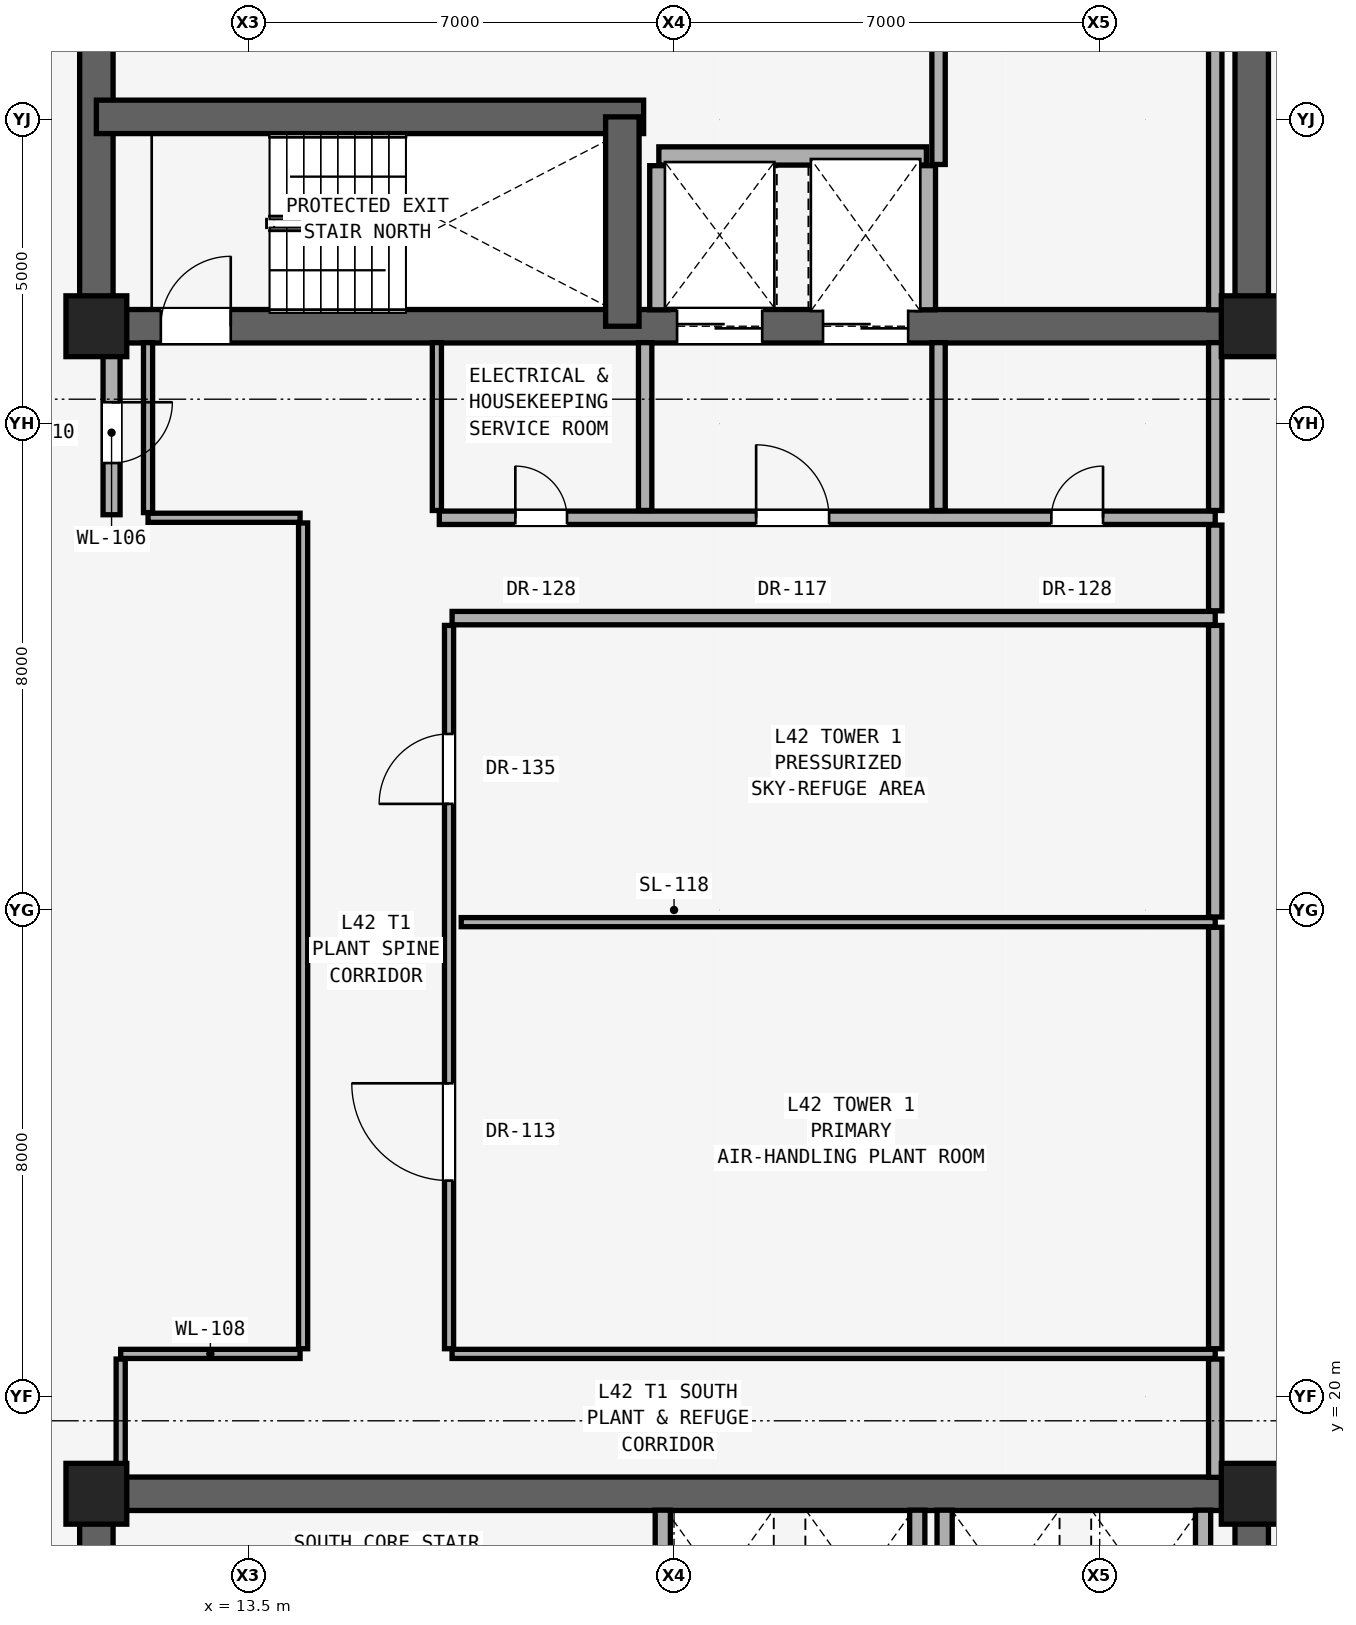
"""IFC4 building model, lengths in metres.
Left out: names, types, materials, properties, quantities, classifications, styles, units other than length and angle.
Written with IfcOpenShell. Run it as: python <this file> out.ifc"""

import sys

from ifc_helpers import new_model, si_unit, direction, frame, frame_2d, origin, origin_2d, place, context, subcontext, project, spatial, rectangle, extrude, element, fill, save


model = new_model("IFC4")
c1 = context("Model", 3, precision=1e-05, world=origin(), true_north=direction((0.0, 1.0)))
c2 = subcontext(c1, "Body", "Model", "MODEL_VIEW")
j1 = project(units=[si_unit("LENGTHUNIT", "METRE"), si_unit("PLANEANGLEUNIT", "RADIAN")], contexts=[c1])
p1 = place(None, origin())
s1 = spatial("IfcSite", under=j1, at=p1, CompositionType="ELEMENT")
p2 = place(p1, origin())
s2 = spatial("IfcBuilding", under=s1, at=p2, CompositionType="ELEMENT")
p3 = place(p2, frame((0.0, 0.0, 147.8)))
s3 = spatial("IfcBuildingStorey", under=s2, at=p3, CompositionType="ELEMENT", Elevation=147.8)
for number, where, z_axis, x_axis in (
    (1, (11.0, 18.4, 0.0), (0.0, 0.0, 1.0), (1.0, 0.0, 0.0)),
    (2, (30.0, 18.4, 0.0), (0.0, 0.0, 1.0), (1.0, 0.0, 0.0)),
    (3, (11.0, 37.6, 0.0), (0.0, 0.0, 1.0), (1.0, 0.0, 0.0)),
    (4, (30.0, 37.6, 0.0), (0.0, 0.0, 1.0), (1.0, 0.0, 0.0)),
):
    element("IfcColumn", number, at=place(p3, frame(where, z_axis=z_axis, x_axis=x_axis)), inside=s3, PredefinedType="COLUMN", context=c2, shape_type="SweptSolid", body=[
        extrude(rectangle(XDim=1.0, YDim=1.0, at=origin_2d()), origin(), (0.0, 0.0, 1.0), 6.6),
    ])
for number, where, z_axis, x_axis in (
    (5, (11.0, 37.6, 0.0), (0.0, 0.0, 1.0), (0.0, 1.0, 0.0)),
    (6, (30.0, 37.6, 0.0), (0.0, 0.0, 1.0), (0.0, 1.0, 0.0)),
):
    element("IfcWall", number, at=place(p3, frame(where, z_axis=z_axis, x_axis=x_axis)), inside=s3, PredefinedType="SHEAR", context=c2, shape_type="SweptSolid", body=[
        extrude(rectangle(XDim=6.0, YDim=0.55, at=frame_2d((3.0, 0.0))), origin(), (0.0, 0.0, 1.0), 6.4),
    ])
p4 = place(p3, frame((11.0, 37.6, 0.0), z_axis=(0.0, 0.0, 1.0), x_axis=(1.0, 0.0, 0.0)))
e7 = element("IfcWall", 7, at=p4, inside=s3, PredefinedType="SHEAR", context=c2, shape_type="SweptSolid", body=[
    extrude(rectangle(XDim=19.0, YDim=0.55, at=frame_2d((9.5, 0.0))), origin(), (0.0, 0.0, 1.0), 6.4),
])
p5 = place(p4, frame((1.06, 0.0, 0.0)))
e8 = element("IfcOpeningElement", 8, at=p5, cuts=e7, PredefinedType="OPENING", context=c2, shape_type="SweptSolid", body=[
    extrude(rectangle(XDim=1.15, YDim=2.2, at=frame_2d((0.575, 1.1))), frame((0.0, 0.285, 0.0), z_axis=(0.0, -1.0, 0.0), x_axis=(1.0, 0.0, 0.0)), (0.0, 0.0, 1.0), 0.57),
])
p6 = place(p4, frame((9.55, 0.0, 0.0)))
e9 = element("IfcOpeningElement", 9, at=p6, cuts=e7, PredefinedType="OPENING", context=c2, shape_type="SweptSolid", body=[
    extrude(rectangle(XDim=1.4, YDim=2.35, at=frame_2d((0.7, 1.175))), frame((0.0, 0.285, 0.0), z_axis=(0.0, -1.0, 0.0), x_axis=(1.0, 0.0, 0.0)), (0.0, 0.0, 1.0), 0.57),
])
p7 = place(p4, frame((11.95, 0.0, 0.0)))
e10 = element("IfcOpeningElement", 10, at=p7, cuts=e7, PredefinedType="OPENING", context=c2, shape_type="SweptSolid", body=[
    extrude(rectangle(XDim=1.4, YDim=2.35, at=frame_2d((0.7, 1.175))), frame((0.0, 0.285, 0.0), z_axis=(0.0, -1.0, 0.0), x_axis=(1.0, 0.0, 0.0)), (0.0, 0.0, 1.0), 0.57),
])
p8 = place(p3, frame((11.0, 41.043, 0.0), z_axis=(0.0, 0.0, 1.0), x_axis=(1.0, 0.0, 0.0)))
e11 = element("IfcWall", 11, at=p8, inside=s3, PredefinedType="SHEAR", context=c2, shape_type="SweptSolid", body=[
    extrude(rectangle(XDim=9.0, YDim=0.55, at=frame_2d((4.5, 0.0))), origin(), (0.0, 0.0, 1.0), 6.4),
])
p9 = place(p3, frame((19.65, 37.6, 0.0), z_axis=(0.0, 0.0, 1.0), x_axis=(0.0, 1.0, 0.0)))
e12 = element("IfcWall", 12, at=p9, inside=s3, PredefinedType="SHEAR", context=c2, shape_type="SweptSolid", body=[
    extrude(rectangle(XDim=3.443, YDim=0.55, at=frame_2d((1.721, 0.0))), origin(), (0.0, 0.0, 1.0), 6.4),
])
for number, where, z_axis, x_axis in (
    (13, (11.0, 12.4, 0.0), (0.0, 0.0, 1.0), (0.0, 1.0, 0.0)),
    (14, (30.0, 12.4, 0.0), (0.0, 0.0, 1.0), (0.0, 1.0, 0.0)),
):
    element("IfcWall", number, at=place(p3, frame(where, z_axis=z_axis, x_axis=x_axis)), inside=s3, PredefinedType="SHEAR", context=c2, shape_type="SweptSolid", body=[
        extrude(rectangle(XDim=6.0, YDim=0.55, at=frame_2d((3.0, 0.0))), origin(), (0.0, 0.0, 1.0), 6.4),
    ])
p10 = place(p3, frame((11.0, 18.4, 0.0), z_axis=(0.0, 0.0, 1.0), x_axis=(1.0, 0.0, 0.0)))
e15 = element("IfcWall", 15, at=p10, inside=s3, PredefinedType="SHEAR", context=c2, shape_type="SweptSolid", body=[
    extrude(rectangle(XDim=19.0, YDim=0.55, at=frame_2d((9.5, 0.0))), origin(), (0.0, 0.0, 1.0), 6.4),
])
p11 = place(p3, frame((11.25, 37.2, 0.0), z_axis=(0.0, 0.0, 1.0), x_axis=(0.0, -1.0, 0.0)))
e16 = element("IfcWall", 16, at=p11, inside=s3, PredefinedType="SOLIDWALL", context=c2, shape_type="SweptSolid", body=[
    extrude(rectangle(XDim=2.7, YDim=0.28, at=frame_2d((1.35, 0.0))), origin(), (0.0, 0.0, 1.0), 4.95),
])
p12 = place(p11, frame((0.85, 0.0, 0.0)))
e17 = element("IfcOpeningElement", 17, at=p12, cuts=e16, PredefinedType="OPENING", context=c2, shape_type="SweptSolid", body=[
    extrude(rectangle(XDim=1.0, YDim=2.15, at=frame_2d((0.5, 1.075))), frame((0.0, 0.15, 0.0), z_axis=(0.0, -1.0, 0.0), x_axis=(1.0, 0.0, 0.0)), (0.0, 0.0, 1.0), 0.3),
])
p13 = place(p3, frame((11.4, 20.7, 0.0), z_axis=(0.0, 0.0, 1.0), x_axis=(1.0, 0.0, 0.0)))
e18 = element("IfcWall", 18, at=p13, inside=s3, PredefinedType="PARTITIONING", context=c2, shape_type="SweptSolid", body=[
    extrude(rectangle(XDim=2.95, YDim=0.15, at=frame_2d((1.475, 0.0))), origin(), (0.0, 0.0, 1.0), 6.4),
])
p14 = place(p3, frame((16.85, 20.7, 0.0), z_axis=(0.0, 0.0, 1.0), x_axis=(1.0, 0.0, 0.0)))
e19 = element("IfcWall", 19, at=p14, inside=s3, PredefinedType="PARTITIONING", context=c2, shape_type="SweptSolid", body=[
    extrude(rectangle(XDim=12.55, YDim=0.15, at=frame_2d((6.275, 0.0))), origin(), (0.0, 0.0, 1.0), 5.975),
])
p15 = place(p3, frame((17.0, 27.8, 0.0), z_axis=(0.0, 0.0, 1.0), x_axis=(1.0, 0.0, 0.0)))
e20 = element("IfcWall", 20, at=p15, inside=s3, PredefinedType="PARTITIONING", context=c2, shape_type="SweptSolid", body=[
    extrude(rectangle(XDim=12.4, YDim=0.15, at=frame_2d((6.2, 0.0))), origin(), (0.0, 0.0, 1.0), 5.975),
])
p16 = place(p3, frame((16.85, 32.8, 0.0), z_axis=(0.0, 0.0, 1.0), x_axis=(1.0, 0.0, 0.0)))
e21 = element("IfcWall", 21, at=p16, inside=s3, PredefinedType="SOLIDWALL", context=c2, shape_type="SweptSolid", body=[
    extrude(rectangle(XDim=12.55, YDim=0.22, at=frame_2d((6.275, 0.0))), origin(), (0.0, 0.0, 1.0), 5.975),
])
p17 = place(p3, frame((11.85, 34.45, 0.0), z_axis=(0.0, 0.0, 1.0), x_axis=(1.0, 0.0, 0.0)))
e22 = element("IfcWall", 22, at=p17, inside=s3, PredefinedType="PARTITIONING", context=c2, shape_type="SweptSolid", body=[
    extrude(rectangle(XDim=2.5, YDim=0.15, at=frame_2d((1.25, 0.0))), origin(), (0.0, 0.0, 1.0), 6.4),
])
p18 = place(p3, frame((16.64, 34.45, 0.0), z_axis=(0.0, 0.0, 1.0), x_axis=(1.0, 0.0, 0.0)))
e23 = element("IfcWall", 23, at=p18, inside=s3, PredefinedType="SOLIDWALL", context=c2, shape_type="SweptSolid", body=[
    extrude(rectangle(XDim=12.76, YDim=0.22, at=frame_2d((6.38, 0.0))), origin(), (0.0, 0.0, 1.0), 5.975),
])
p19 = place(p18, frame((5.21, 0.0, 0.0)))
e24 = element("IfcOpeningElement", 24, at=p19, cuts=e23, PredefinedType="OPENING", context=c2, shape_type="SweptSolid", body=[
    extrude(rectangle(XDim=1.2, YDim=2.25, at=frame_2d((0.6, 1.125))), frame((0.0, 0.12, 0.0), z_axis=(0.0, -1.0, 0.0), x_axis=(1.0, 0.0, 0.0)), (0.0, 0.0, 1.0), 0.24),
])
p20 = place(p18, frame((10.065, 0.0, 0.0)))
e25 = element("IfcOpeningElement", 25, at=p20, cuts=e23, PredefinedType="OPENING", context=c2, shape_type="SweptSolid", body=[
    extrude(rectangle(XDim=0.85, YDim=2.01, at=frame_2d((0.425, 1.005))), frame((0.0, 0.12, 0.0), z_axis=(0.0, -1.0, 0.0), x_axis=(1.0, 0.0, 0.0)), (0.0, 0.0, 1.0), 0.24),
])
p21 = place(p18, frame((1.25, 0.0, 0.0)))
e26 = element("IfcOpeningElement", 26, at=p21, cuts=e23, PredefinedType="OPENING", context=c2, shape_type="SweptSolid", body=[
    extrude(rectangle(XDim=0.85, YDim=2.01, at=frame_2d((0.425, 1.005))), frame((0.0, 0.12, 0.0), z_axis=(0.0, -1.0, 0.0), x_axis=(1.0, 0.0, 0.0)), (0.0, 0.0, 1.0), 0.24),
])
p22 = place(p3, frame((20.25, 40.4, 0.0), z_axis=(0.0, 0.0, 1.0), x_axis=(1.0, 0.0, 0.0)))
e27 = element("IfcWall", 27, at=p22, inside=s3, PredefinedType="SOLIDWALL", context=c2, shape_type="SweptSolid", body=[
    extrude(rectangle(XDim=4.4, YDim=0.3, at=frame_2d((2.2, 0.0))), origin(), (0.0, 0.0, 1.0), 6.4),
])
p23 = place(p3, frame((11.4, 18.67, 0.0), z_axis=(0.0, 0.0, 1.0), x_axis=(0.0, 1.0, 0.0)))
e28 = element("IfcWall", 28, at=p23, inside=s3, PredefinedType="PARTITIONING", context=c2, shape_type="SweptSolid", body=[
    extrude(rectangle(XDim=1.945, YDim=0.15, at=frame_2d((0.973, 0.0))), origin(), (0.0, 0.0, 1.0), 6.4),
])
p24 = place(p3, frame((11.85, 34.535, 0.0), z_axis=(0.0, 0.0, 1.0), x_axis=(0.0, 1.0, 0.0)))
e29 = element("IfcWall", 29, at=p24, inside=s3, PredefinedType="PARTITIONING", context=c2, shape_type="SweptSolid", body=[
    extrude(rectangle(XDim=2.795, YDim=0.15, at=frame_2d((1.397, 0.0))), origin(), (0.0, 0.0, 1.0), 6.4),
])
p25 = place(p3, frame((14.4, 20.785, 0.0), z_axis=(0.0, 0.0, 1.0), x_axis=(0.0, 1.0, 0.0)))
e30 = element("IfcWall", 30, at=p25, inside=s3, PredefinedType="PARTITIONING", context=c2, shape_type="SweptSolid", body=[
    extrude(rectangle(XDim=13.58, YDim=0.15, at=frame_2d((6.79, 0.0))), origin(), (0.0, 0.0, 1.0), 5.536),
])
p26 = place(p3, frame((16.6, 34.57, 0.0), z_axis=(0.0, 0.0, 1.0), x_axis=(0.0, 1.0, 0.0)))
e31 = element("IfcWall", 31, at=p26, inside=s3, PredefinedType="PARTITIONING", context=c2, shape_type="SweptSolid", body=[
    extrude(rectangle(XDim=2.76, YDim=0.15, at=frame_2d((1.38, 0.0))), origin(), (0.0, 0.0, 1.0), 6.4),
])
p27 = place(p3, frame((16.8, 20.785, 0.0), z_axis=(0.0, 0.0, 1.0), x_axis=(0.0, 1.0, 0.0)))
e32 = element("IfcWall", 32, at=p27, inside=s3, PredefinedType="PARTITIONING", context=c2, shape_type="SweptSolid", body=[
    extrude(rectangle(XDim=11.895, YDim=0.15, at=frame_2d((5.948, 0.0))), origin(), (0.0, 0.0, 1.0), 5.536),
])
p28 = place(p27, frame((8.96, 0.0, 0.0)))
e33 = element("IfcOpeningElement", 33, at=p28, cuts=e32, PredefinedType="OPENING", context=c2, shape_type="SweptSolid", body=[
    extrude(rectangle(XDim=1.15, YDim=2.2, at=frame_2d((0.575, 1.1))), frame((0.0, 0.085, 0.0), z_axis=(0.0, -1.0, 0.0), x_axis=(1.0, 0.0, 0.0)), (0.0, 0.0, 1.0), 0.17),
])
p29 = place(p27, frame((2.765, 0.0, 0.0)))
e34 = element("IfcOpeningElement", 34, at=p29, cuts=e32, PredefinedType="OPENING", context=c2, shape_type="SweptSolid", body=[
    extrude(rectangle(XDim=1.6, YDim=2.3, at=frame_2d((0.8, 1.15))), frame((0.0, 0.085, 0.0), z_axis=(0.0, -1.0, 0.0), x_axis=(1.0, 0.0, 0.0)), (0.0, 0.0, 1.0), 0.17),
])
p30 = place(p3, frame((20.025, 34.57, 0.0), z_axis=(0.0, 0.0, 1.0), x_axis=(0.0, 1.0, 0.0)))
e35 = element("IfcWall", 35, at=p30, inside=s3, PredefinedType="SOLIDWALL", context=c2, shape_type="SweptSolid", body=[
    extrude(rectangle(XDim=2.76, YDim=0.22, at=frame_2d((1.38, 0.0))), origin(), (0.0, 0.0, 1.0), 6.4),
])
p31 = place(p3, frame((20.315, 16.555, 0.0), z_axis=(0.0, 0.0, 1.0), x_axis=(0.0, 1.0, 0.0)))
e36 = element("IfcWall", 36, at=p31, inside=s3, PredefinedType="SOLIDWALL", context=c2, shape_type="SweptSolid", body=[
    extrude(rectangle(XDim=1.575, YDim=0.25, at=frame_2d((0.788, 0.0))), origin(), (0.0, 0.0, 1.0), 6.4),
])
p32 = place(p3, frame((20.25, 37.87, 0.0), z_axis=(0.0, 0.0, 1.0), x_axis=(0.0, 1.0, 0.0)))
e37 = element("IfcWall", 37, at=p32, inside=s3, PredefinedType="SOLIDWALL", context=c2, shape_type="SweptSolid", body=[
    extrude(rectangle(XDim=2.37, YDim=0.3, at=frame_2d((1.185, 0.0))), origin(), (0.0, 0.0, 1.0), 6.4),
])
p33 = place(p3, frame((24.5, 15.785, 0.0), z_axis=(0.0, 0.0, 1.0), x_axis=(0.0, 1.0, 0.0)))
e38 = element("IfcWall", 38, at=p33, inside=s3, PredefinedType="SOLIDWALL", context=c2, shape_type="SweptSolid", body=[
    extrude(rectangle(XDim=2.345, YDim=0.25, at=frame_2d((1.172, 0.0))), origin(), (0.0, 0.0, 1.0), 6.4),
])
p34 = place(p3, frame((24.65, 37.87, 0.0), z_axis=(0.0, 0.0, 1.0), x_axis=(0.0, 1.0, 0.0)))
e39 = element("IfcWall", 39, at=p34, inside=s3, PredefinedType="SOLIDWALL", context=c2, shape_type="SweptSolid", body=[
    extrude(rectangle(XDim=2.37, YDim=0.3, at=frame_2d((1.185, 0.0))), origin(), (0.0, 0.0, 1.0), 6.4),
])
p35 = place(p3, frame((24.95, 15.785, 0.0), z_axis=(0.0, 0.0, 1.0), x_axis=(0.0, 1.0, 0.0)))
e40 = element("IfcWall", 40, at=p35, inside=s3, PredefinedType="SOLIDWALL", context=c2, shape_type="SweptSolid", body=[
    extrude(rectangle(XDim=2.345, YDim=0.25, at=frame_2d((1.172, 0.0))), origin(), (0.0, 0.0, 1.0), 6.4),
])
p36 = place(p3, frame((24.85, 34.57, 0.0), z_axis=(0.0, 0.0, 1.0), x_axis=(0.0, 1.0, 0.0)))
e41 = element("IfcWall", 41, at=p36, inside=s3, PredefinedType="SOLIDWALL", context=c2, shape_type="SweptSolid", body=[
    extrude(rectangle(XDim=2.76, YDim=0.22, at=frame_2d((1.38, 0.0))), origin(), (0.0, 0.0, 1.0), 6.4),
])
p37 = place(p3, frame((24.85, 40.26, 0.0), z_axis=(0.0, 0.0, 1.0), x_axis=(0.0, 1.0, 0.0)))
e42 = element("IfcWall", 42, at=p37, inside=s3, PredefinedType="SOLIDWALL", context=c2, shape_type="SweptSolid", body=[
    extrude(rectangle(XDim=2.94, YDim=0.22, at=frame_2d((1.47, 0.0))), origin(), (0.0, 0.0, 1.0), 6.4),
])
p38 = place(p3, frame((29.2, 15.785, 0.0), z_axis=(0.0, 0.0, 1.0), x_axis=(0.0, 1.0, 0.0)))
e43 = element("IfcWall", 43, at=p38, inside=s3, PredefinedType="SOLIDWALL", context=c2, shape_type="SweptSolid", body=[
    extrude(rectangle(XDim=2.345, YDim=0.25, at=frame_2d((1.172, 0.0))), origin(), (0.0, 0.0, 1.0), 6.4),
])
p39 = place(p3, frame((29.4, 18.67, 0.0), z_axis=(0.0, 0.0, 1.0), x_axis=(0.0, 1.0, 0.0)))
e44 = element("IfcWall", 44, at=p39, inside=s3, PredefinedType="SOLIDWALL", context=c2, shape_type="SweptSolid", body=[
    extrude(rectangle(XDim=1.945, YDim=0.22, at=frame_2d((0.973, 0.0))), origin(), (0.0, 0.0, 1.0), 6.4),
])
p40 = place(p3, frame((29.4, 20.785, 0.0), z_axis=(0.0, 0.0, 1.0), x_axis=(0.0, 1.0, 0.0)))
e45 = element("IfcWall", 45, at=p40, inside=s3, PredefinedType="SOLIDWALL", context=c2, shape_type="SweptSolid", body=[
    extrude(rectangle(XDim=6.93, YDim=0.22, at=frame_2d((3.465, 0.0))), origin(), (0.0, 0.0, 1.0), 5.536),
])
p41 = place(p3, frame((29.4, 27.885, 0.0), z_axis=(0.0, 0.0, 1.0), x_axis=(0.0, 1.0, 0.0)))
e46 = element("IfcWall", 46, at=p41, inside=s3, PredefinedType="SOLIDWALL", context=c2, shape_type="SweptSolid", body=[
    extrude(rectangle(XDim=4.795, YDim=0.22, at=frame_2d((2.397, 0.0))), origin(), (0.0, 0.0, 1.0), 5.536),
])
p42 = place(p3, frame((29.4, 32.92, 0.0), z_axis=(0.0, 0.0, 1.0), x_axis=(0.0, 1.0, 0.0)))
e47 = element("IfcWall", 47, at=p42, inside=s3, PredefinedType="SOLIDWALL", context=c2, shape_type="SweptSolid", body=[
    extrude(rectangle(XDim=1.41, YDim=0.22, at=frame_2d((0.705, 0.0))), origin(), (0.0, 0.0, 1.0), 6.4),
])
p43 = place(p3, frame((29.4, 34.57, 0.0), z_axis=(0.0, 0.0, 1.0), x_axis=(0.0, 1.0, 0.0)))
e48 = element("IfcWall", 48, at=p43, inside=s3, PredefinedType="SOLIDWALL", context=c2, shape_type="SweptSolid", body=[
    extrude(rectangle(XDim=2.76, YDim=0.22, at=frame_2d((1.38, 0.0))), origin(), (0.0, 0.0, 1.0), 6.4),
])
p44 = place(p3, frame((29.4, 37.87, 0.0), z_axis=(0.0, 0.0, 1.0), x_axis=(0.0, 1.0, 0.0)))
e49 = element("IfcWall", 49, at=p44, inside=s3, PredefinedType="SOLIDWALL", context=c2, shape_type="SweptSolid", body=[
    extrude(rectangle(XDim=5.33, YDim=0.22, at=frame_2d((2.665, 0.0))), origin(), (0.0, 0.0, 1.0), 6.4),
])
p45 = place(p12, origin())
e50 = element("IfcDoor", 50, at=p45, inside=s3, OperationType="SINGLE_SWING_LEFT", PredefinedType="DOOR", context=c2, shape_type="SweptSolid", body=[
    extrude(rectangle(XDim=1.0, YDim=2.15, at=frame_2d((0.5, 1.075))), frame((0.0, 0.025, 0.0), z_axis=(0.0, -1.0, 0.0), x_axis=(1.0, 0.0, 0.0)), (0.0, 0.0, 1.0), 0.05),
])
fill(e17, e50)
p46 = place(p5, origin())
e51 = element("IfcDoor", 51, at=p46, inside=s3, OperationType="SINGLE_SWING_RIGHT", PredefinedType="DOOR", context=c2, shape_type="SweptSolid", body=[
    extrude(rectangle(XDim=1.15, YDim=2.2, at=frame_2d((0.575, 1.1))), frame((0.0, 0.025, 0.0), z_axis=(0.0, -1.0, 0.0), x_axis=(1.0, 0.0, 0.0)), (0.0, 0.0, 1.0), 0.05),
])
fill(e8, e51)
p47 = place(p19, origin())
e52 = element("IfcDoor", 52, at=p47, inside=s3, OperationType="SINGLE_SWING_LEFT", PredefinedType="DOOR", context=c2, shape_type="SweptSolid", body=[
    extrude(rectangle(XDim=1.2, YDim=2.25, at=frame_2d((0.6, 1.125))), frame((0.0, 0.025, 0.0), z_axis=(0.0, -1.0, 0.0), x_axis=(1.0, 0.0, 0.0)), (0.0, 0.0, 1.0), 0.05),
])
fill(e24, e52)
p48 = place(p20, origin())
e53 = element("IfcDoor", 53, at=p48, inside=s3, OperationType="SINGLE_SWING_RIGHT", PredefinedType="DOOR", context=c2, shape_type="SweptSolid", body=[
    extrude(rectangle(XDim=0.85, YDim=2.01, at=frame_2d((0.425, 1.005))), frame((0.0, 0.025, 0.0), z_axis=(0.0, -1.0, 0.0), x_axis=(1.0, 0.0, 0.0)), (0.0, 0.0, 1.0), 0.05),
])
fill(e25, e53)
p49 = place(p21, origin())
e54 = element("IfcDoor", 54, at=p49, inside=s3, OperationType="SINGLE_SWING_LEFT", PredefinedType="DOOR", context=c2, shape_type="SweptSolid", body=[
    extrude(rectangle(XDim=0.85, YDim=2.01, at=frame_2d((0.425, 1.005))), frame((0.0, 0.025, 0.0), z_axis=(0.0, -1.0, 0.0), x_axis=(1.0, 0.0, 0.0)), (0.0, 0.0, 1.0), 0.05),
])
fill(e26, e54)
p50 = place(p28, origin())
e55 = element("IfcDoor", 55, at=p50, inside=s3, OperationType="SINGLE_SWING_LEFT", PredefinedType="DOOR", context=c2, shape_type="SweptSolid", body=[
    extrude(rectangle(XDim=1.15, YDim=2.2, at=frame_2d((0.575, 1.1))), frame((0.0, 0.025, 0.0), z_axis=(0.0, -1.0, 0.0), x_axis=(1.0, 0.0, 0.0)), (0.0, 0.0, 1.0), 0.05),
])
fill(e33, e55)
p51 = place(p29, origin())
e56 = element("IfcDoor", 56, at=p51, inside=s3, OperationType="SINGLE_SWING_RIGHT", PredefinedType="DOOR", context=c2, shape_type="SweptSolid", body=[
    extrude(rectangle(XDim=1.6, YDim=2.3, at=frame_2d((0.8, 1.15))), frame((0.0, 0.025, 0.0), z_axis=(0.0, -1.0, 0.0), x_axis=(1.0, 0.0, 0.0)), (0.0, 0.0, 1.0), 0.05),
])
fill(e34, e56)
p52 = place(p6, origin())
e57 = element("IfcDoor", 57, at=p52, inside=s3, OperationType="DOUBLE_DOOR_SLIDING", PredefinedType="DOOR", context=c2, shape_type="SweptSolid", body=[
    extrude(rectangle(XDim=1.4, YDim=2.35, at=frame_2d((0.7, 1.175))), frame((0.0, 0.025, 0.0), z_axis=(0.0, -1.0, 0.0), x_axis=(1.0, 0.0, 0.0)), (0.0, 0.0, 1.0), 0.05),
])
fill(e9, e57)
p53 = place(p7, origin())
e58 = element("IfcDoor", 58, at=p53, inside=s3, OperationType="DOUBLE_DOOR_SLIDING", PredefinedType="DOOR", context=c2, shape_type="SweptSolid", body=[
    extrude(rectangle(XDim=1.4, YDim=2.35, at=frame_2d((0.7, 1.175))), frame((0.0, 0.025, 0.0), z_axis=(0.0, -1.0, 0.0), x_axis=(1.0, 0.0, 0.0)), (0.0, 0.0, 1.0), 0.05),
])
fill(e10, e58)
save(model, sys.argv[1])
